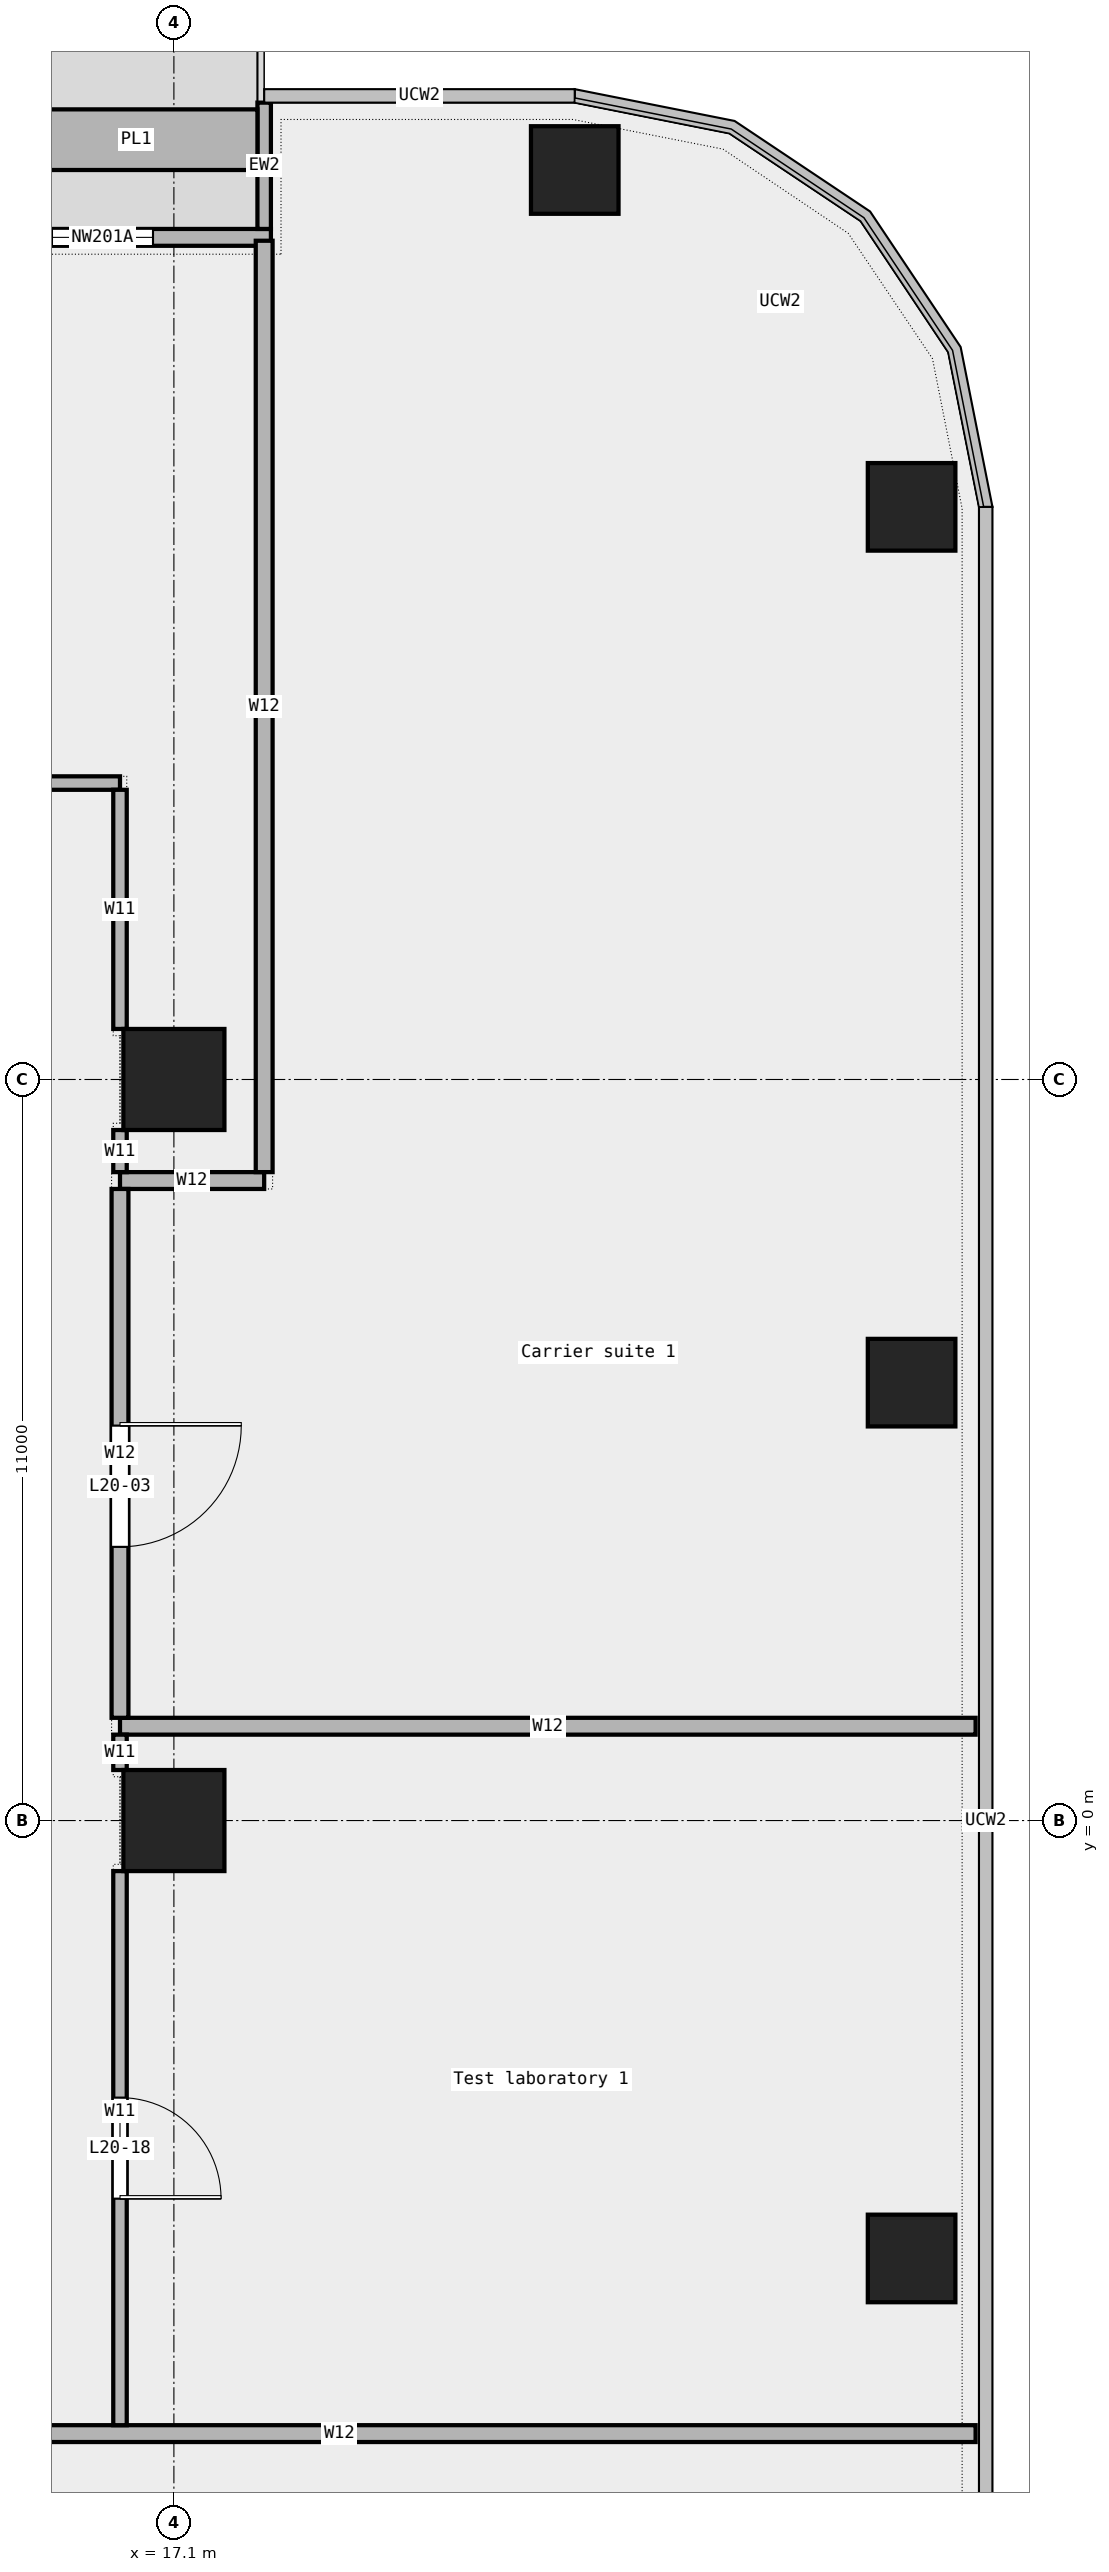
"""IFC4 building model, lengths in metres.
Left out: names, types, materials, properties, quantities, classifications, styles, units other than length and angle.
Written with IfcOpenShell. Run it as: python <this file> out.ifc"""

import sys

from ifc_helpers import new_model, si_unit, direction, frame, frame_2d, origin, origin_2d, place, context, subcontext, project, spatial, rectangle, extrude, element, fill, save


model = new_model("IFC4")
c1 = context("Model", 3, precision=1e-05, world=origin(), true_north=direction((0.0, 1.0)))
c2 = subcontext(c1, "Body", "Model", "MODEL_VIEW")
j1 = project(units=[si_unit("LENGTHUNIT", "METRE"), si_unit("PLANEANGLEUNIT", "RADIAN")], contexts=[c1])
p1 = place(None, origin())
s1 = spatial("IfcSite", under=j1, at=p1, CompositionType="ELEMENT")
p2 = place(p1, origin())
s2 = spatial("IfcBuilding", under=s1, at=p2, CompositionType="ELEMENT")
p3 = place(p2, frame((0.0, 0.0, 103.6)))
s3 = spatial("IfcBuildingStorey", under=s2, at=p3, CompositionType="ELEMENT", Elevation=103.6)
for number, where, z_axis, x_axis in (
    (1, (28.05, -6.5, 0.0), (0.0, 0.0, 1.0), (1.0, 0.0, 0.0)),
    (2, (28.05, 6.5, 0.0), (0.0, 0.0, 1.0), (1.0, 0.0, 0.0)),
    (3, (28.05, 19.5, 0.0), (0.0, 0.0, 1.0), (1.0, 0.0, 0.0)),
    (4, (23.05, 24.5, 0.0), (0.0, 0.0, 1.0), (1.0, 0.0, 0.0)),
):
    element("IfcColumn", number, at=place(p3, frame(where, z_axis=z_axis, x_axis=x_axis)), inside=s3, PredefinedType="COLUMN", context=c2, shape_type="SweptSolid", body=[
        extrude(rectangle(XDim=1.3, YDim=1.3, at=origin_2d()), origin(), (0.0, 0.0, 1.0), 4.05),
    ])
for number, where, z_axis, x_axis in (
    (5, (17.1, 0.0, 0.0), (0.0, 0.0, 1.0), (1.0, 0.0, 0.0)),
    (6, (17.1, 11.0, 0.0), (0.0, 0.0, 1.0), (1.0, 0.0, 0.0)),
):
    element("IfcColumn", number, at=place(p3, frame(where, z_axis=z_axis, x_axis=x_axis)), inside=s3, PredefinedType="COLUMN", context=c2, shape_type="SweptSolid", body=[
        extrude(rectangle(XDim=1.5, YDim=1.5, at=origin_2d()), origin(), (0.0, 0.0, 1.0), 4.05),
    ])
p4 = place(p3, frame((18.54, 23.5, 0.0), z_axis=(0.0, 0.0, 1.0), x_axis=(-1.0, 0.0, 0.0)))
e7 = element("IfcWall", 7, at=p4, inside=s3, PredefinedType="STANDARD", context=c2, shape_type="SweptSolid", body=[
    extrude(rectangle(XDim=14.03, YDim=0.25, at=frame_2d((7.015, 0.0))), origin(), (0.0, 0.0, 1.0), 4.05),
])
p5 = place(p4, frame((1.75, 0.0, 0.45)))
e8 = element("IfcOpeningElement", 8, at=p5, cuts=e7, PredefinedType="OPENING", context=c2, shape_type="SweptSolid", body=[
    extrude(rectangle(XDim=1.5, YDim=3.0, at=frame_2d((0.75, 1.5))), frame((0.0, 0.137, 0.0), z_axis=(0.0, -1.0, 0.0), x_axis=(1.0, 0.0, 0.0)), (0.0, 0.0, 1.0), 0.274),
])
p6 = place(p4, frame((4.25, 0.0, 0.0)))
e9 = element("IfcOpeningElement", 9, at=p6, cuts=e7, PredefinedType="OPENING", context=c2, shape_type="SweptSolid", body=[
    extrude(rectangle(XDim=1.8, YDim=2.4, at=frame_2d((0.9, 1.2))), frame((0.0, 0.137, 0.0), z_axis=(0.0, -1.0, 0.0), x_axis=(1.0, 0.0, 0.0)), (0.0, 0.0, 1.0), 0.274),
])
p7 = place(p4, frame((10.75, 0.0, 0.45)))
e10 = element("IfcOpeningElement", 10, at=p7, cuts=e7, PredefinedType="OPENING", context=c2, shape_type="SweptSolid", body=[
    extrude(rectangle(XDim=1.5, YDim=3.0, at=frame_2d((0.75, 1.5))), frame((0.0, 0.137, 0.0), z_axis=(0.0, -1.0, 0.0), x_axis=(1.0, 0.0, 0.0)), (0.0, 0.0, 1.0), 0.274),
])
p8 = place(p3, frame((18.44, 25.5, 0.0), z_axis=(0.0, 0.0, 1.0), x_axis=(0.0, -1.0, 0.0)))
e11 = element("IfcWall", 11, at=p8, inside=s3, PredefinedType="STANDARD", context=c2, shape_type="SweptSolid", body=[
    extrude(rectangle(XDim=1.875, YDim=0.2, at=frame_2d((0.938, 0.0))), origin(), (0.0, 0.0, 1.0), 4.05),
])
p9 = place(p3, frame((18.34, 24.95, 0.0), z_axis=(0.0, 0.0, 1.0), x_axis=(-1.0, 0.0, 0.0)))
e12 = element("IfcWall", 12, at=p9, inside=s3, PredefinedType="STANDARD", context=c2, shape_type="SweptSolid", body=[
    extrude(rectangle(XDim=3.6, YDim=0.9, at=frame_2d((1.8, 0.0))), origin(), (0.0, 0.0, 1.0), 0.7),
])
p10 = place(p3, frame((10.115, -9.1, 0.0), z_axis=(0.0, 0.0, 1.0), x_axis=(1.0, 0.0, 0.0)))
e13 = element("IfcWall", 13, at=p10, inside=s3, PredefinedType="PARTITIONING", context=c2, shape_type="SweptSolid", body=[
    extrude(rectangle(XDim=18.885, YDim=0.25, at=frame_2d((9.442, 0.0))), origin(), (0.0, 0.0, 1.0), 4.05),
])
p11 = place(p3, frame((16.3, 1.4, 0.0), z_axis=(0.0, 0.0, 1.0), x_axis=(1.0, 0.0, 0.0)))
e14 = element("IfcWall", 14, at=p11, inside=s3, PredefinedType="PARTITIONING", context=c2, shape_type="SweptSolid", body=[
    extrude(rectangle(XDim=12.7, YDim=0.25, at=frame_2d((6.35, 0.0))), origin(), (0.0, 0.0, 1.0), 4.05),
])
p12 = place(p3, frame((16.3, 9.5, 0.0), z_axis=(0.0, 0.0, 1.0), x_axis=(1.0, 0.0, 0.0)))
e15 = element("IfcWall", 15, at=p12, inside=s3, PredefinedType="PARTITIONING", context=c2, shape_type="SweptSolid", body=[
    extrude(rectangle(XDim=2.14, YDim=0.25, at=frame_2d((1.07, 0.0))), origin(), (0.0, 0.0, 1.0), 4.05),
])
p13 = place(p3, frame((1.0, 15.4, 0.0), z_axis=(0.0, 0.0, 1.0), x_axis=(1.0, 0.0, 0.0)))
e16 = element("IfcWall", 16, at=p13, inside=s3, PredefinedType="PARTITIONING", context=c2, shape_type="SweptSolid", body=[
    extrude(rectangle(XDim=15.3, YDim=0.2, at=frame_2d((7.65, 0.0))), origin(), (0.0, 0.0, 1.0), 4.05),
])
p14 = place(p13, frame((1.355, 0.0, 0.0)))
e17 = element("IfcOpeningElement", 17, at=p14, cuts=e16, PredefinedType="OPENING", context=c2, shape_type="SweptSolid", body=[
    extrude(rectangle(XDim=0.9, YDim=2.1, at=frame_2d((0.45, 1.05))), frame((0.0, 0.112, 0.0), z_axis=(0.0, -1.0, 0.0), x_axis=(1.0, 0.0, 0.0)), (0.0, 0.0, 1.0), 0.224),
])
p15 = place(p13, frame((8.705, 0.0, 0.0)))
e18 = element("IfcOpeningElement", 18, at=p15, cuts=e16, PredefinedType="OPENING", context=c2, shape_type="SweptSolid", body=[
    extrude(rectangle(XDim=1.5, YDim=2.1, at=frame_2d((0.75, 1.05))), frame((0.0, 0.112, 0.0), z_axis=(0.0, -1.0, 0.0), x_axis=(1.0, 0.0, 0.0)), (0.0, 0.0, 1.0), 0.224),
])
p16 = place(p3, frame((16.3, -8.975, 0.0), z_axis=(0.0, 0.0, 1.0), x_axis=(0.0, 1.0, 0.0)))
e19 = element("IfcWall", 19, at=p16, inside=s3, PredefinedType="PARTITIONING", context=c2, shape_type="SweptSolid", body=[
    extrude(rectangle(XDim=8.225, YDim=0.2, at=frame_2d((4.113, 0.0))), origin(), (0.0, 0.0, 1.0), 4.05),
])
p17 = place(p16, frame((3.363, 0.0, 0.0)))
e20 = element("IfcOpeningElement", 20, at=p17, cuts=e19, PredefinedType="OPENING", context=c2, shape_type="SweptSolid", body=[
    extrude(rectangle(XDim=1.5, YDim=2.1, at=frame_2d((0.75, 1.05))), frame((0.0, 0.112, 0.0), z_axis=(0.0, -1.0, 0.0), x_axis=(1.0, 0.0, 0.0)), (0.0, 0.0, 1.0), 0.224),
])
p18 = place(p3, frame((16.3, 0.75, 0.0), z_axis=(0.0, 0.0, 1.0), x_axis=(0.0, 1.0, 0.0)))
e21 = element("IfcWall", 21, at=p18, inside=s3, PredefinedType="PARTITIONING", context=c2, shape_type="SweptSolid", body=[
    extrude(rectangle(XDim=0.525, YDim=0.2, at=frame_2d((0.262, 0.0))), origin(), (0.0, 0.0, 1.0), 4.05),
])
p19 = place(p3, frame((16.3, 9.625, 0.0), z_axis=(0.0, 0.0, 1.0), x_axis=(0.0, 1.0, 0.0)))
e22 = element("IfcWall", 22, at=p19, inside=s3, PredefinedType="PARTITIONING", context=c2, shape_type="SweptSolid", body=[
    extrude(rectangle(XDim=0.625, YDim=0.2, at=frame_2d((0.312, 0.0))), origin(), (0.0, 0.0, 1.0), 4.05),
])
p20 = place(p3, frame((16.3, 11.75, 0.0), z_axis=(0.0, 0.0, 1.0), x_axis=(0.0, 1.0, 0.0)))
e23 = element("IfcWall", 23, at=p20, inside=s3, PredefinedType="PARTITIONING", context=c2, shape_type="SweptSolid", body=[
    extrude(rectangle(XDim=3.55, YDim=0.2, at=frame_2d((1.775, 0.0))), origin(), (0.0, 0.0, 1.0), 4.05),
])
p21 = place(p3, frame((16.3, 1.525, 0.0), z_axis=(0.0, 0.0, 1.0), x_axis=(0.0, 1.0, 0.0)))
e24 = element("IfcWall", 24, at=p21, inside=s3, PredefinedType="PARTITIONING", context=c2, shape_type="SweptSolid", body=[
    extrude(rectangle(XDim=7.85, YDim=0.25, at=frame_2d((3.925, 0.0))), origin(), (0.0, 0.0, 1.0), 4.05),
])
p22 = place(p21, frame((2.538, 0.0, 0.0)))
e25 = element("IfcOpeningElement", 25, at=p22, cuts=e24, PredefinedType="OPENING", context=c2, shape_type="SweptSolid", body=[
    extrude(rectangle(XDim=1.8, YDim=2.1, at=frame_2d((0.9, 1.05))), frame((0.0, 0.137, 0.0), z_axis=(0.0, -1.0, 0.0), x_axis=(1.0, 0.0, 0.0)), (0.0, 0.0, 1.0), 0.274),
])
p23 = place(p3, frame((18.44, 9.625, 0.0), z_axis=(0.0, 0.0, 1.0), x_axis=(0.0, 1.0, 0.0)))
e26 = element("IfcWall", 26, at=p23, inside=s3, PredefinedType="PARTITIONING", context=c2, shape_type="SweptSolid", body=[
    extrude(rectangle(XDim=13.825, YDim=0.25, at=frame_2d((6.913, 0.0))), origin(), (0.0, 0.0, 1.0), 4.05),
])
p24 = place(p5, origin())
e27 = element("IfcWindow", 27, at=p24, inside=s3, PartitioningType="SINGLE_PANEL", PredefinedType="WINDOW", context=c2, shape_type="SweptSolid", body=[
    extrude(rectangle(XDim=1.5, YDim=3.0, at=frame_2d((0.75, 1.5))), frame((0.0, 0.03, 0.0), z_axis=(0.0, -1.0, 0.0), x_axis=(1.0, 0.0, 0.0)), (0.0, 0.0, 1.0), 0.06),
])
fill(e8, e27)
p25 = place(p22, origin())
e28 = element("IfcDoor", 28, at=p25, inside=s3, OperationType="DOUBLE_DOOR_SINGLE_SWING", PredefinedType="DOOR", context=c2, shape_type="SweptSolid", body=[
    extrude(rectangle(XDim=1.8, YDim=2.1, at=frame_2d((0.9, 1.05))), frame((0.0, 0.025, 0.0), z_axis=(0.0, -1.0, 0.0), x_axis=(1.0, 0.0, 0.0)), (0.0, 0.0, 1.0), 0.05),
])
fill(e25, e28)
p26 = place(p17, origin())
e29 = element("IfcDoor", 29, at=p26, inside=s3, OperationType="DOUBLE_DOOR_SINGLE_SWING", PredefinedType="DOOR", context=c2, shape_type="SweptSolid", body=[
    extrude(rectangle(XDim=1.5, YDim=2.1, at=frame_2d((0.75, 1.05))), frame((0.0, 0.025, 0.0), z_axis=(0.0, -1.0, 0.0), x_axis=(1.0, 0.0, 0.0)), (0.0, 0.0, 1.0), 0.05),
])
fill(e20, e29)
save(model, sys.argv[1])
